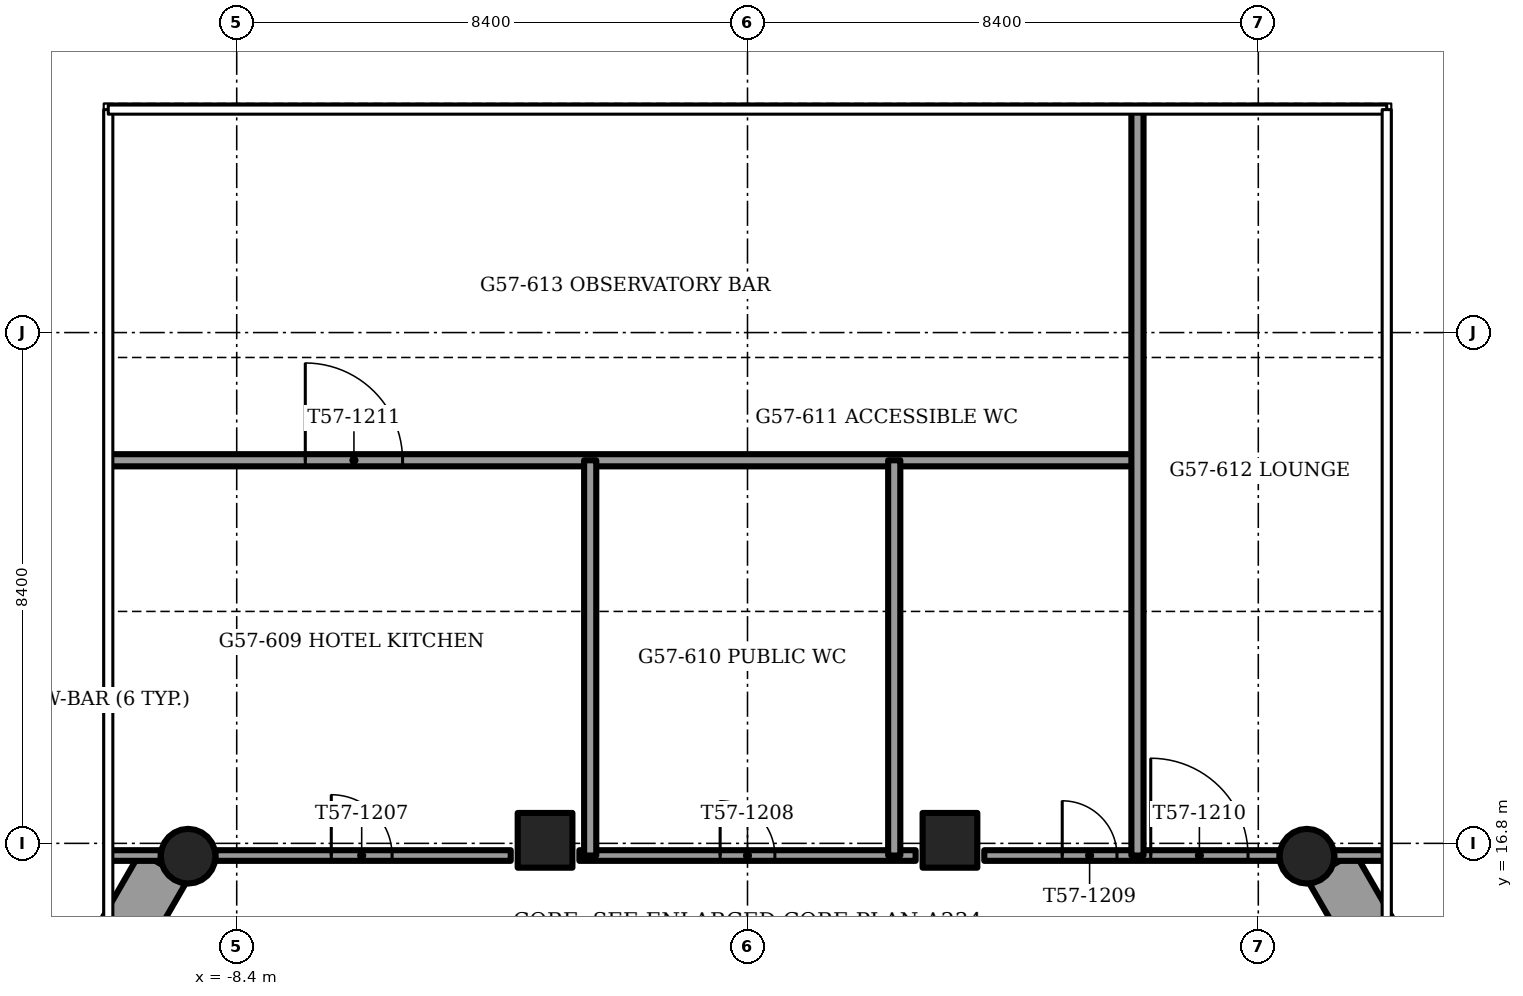
"""IFC4 building model, lengths in metres.
Left out: names, types, materials, properties, quantities, classifications, styles, units other than length and angle.
Written with IfcOpenShell. Run it as: python <this file> out.ifc"""

import sys

from ifc_helpers import new_model, si_unit, direction, frame, frame_2d, origin, origin_2d, place, context, subcontext, project, spatial, rectangle, circle, extrude, element, fill, save


model = new_model("IFC4")
c1 = context("Model", 3, precision=1e-05, world=origin(), true_north=direction((0.0, 1.0)))
c2 = subcontext(c1, "Body", "Model", "MODEL_VIEW")
j1 = project(units=[si_unit("LENGTHUNIT", "METRE"), si_unit("PLANEANGLEUNIT", "RADIAN")], contexts=[c1])
p1 = place(None, origin())
s1 = spatial("IfcSite", under=j1, at=p1, CompositionType="ELEMENT")
p2 = place(p1, origin())
s2 = spatial("IfcBuilding", under=s1, at=p2, CompositionType="ELEMENT")
p3 = place(p2, frame((0.0, 0.0, 229.5)))
s3 = spatial("IfcBuildingStorey", under=s2, at=p3, CompositionType="ELEMENT", Elevation=229.5)
for number, where, z_axis, x_axis in (
    (1, (-9.2, 16.589, -1.2), (0.0, 0.0, 1.0), (1.0, 0.0, 0.0)),
    (2, (9.2, 16.589, -1.2), (0.0, 0.0, 1.0), (1.0, 0.0, 0.0)),
):
    element("IfcColumn", number, at=place(p3, frame(where, z_axis=z_axis, x_axis=x_axis)), inside=s3, PredefinedType="COLUMN", context=c2, shape_type="SweptSolid", body=[
        extrude(circle(Radius=0.45, at=origin_2d()), origin(), (0.0, 0.0, 1.0), 3.75),
    ])
for number, where, z_axis, x_axis in (
    (3, (3.329, 16.85, -1.2), (0.0, 0.0, 1.0), (1.0, 0.0, 0.0)),
    (4, (-3.329, 16.85, -1.2), (0.0, 0.0, 1.0), (1.0, 0.0, 0.0)),
):
    element("IfcColumn", number, at=place(p3, frame(where, z_axis=z_axis, x_axis=x_axis)), inside=s3, PredefinedType="COLUMN", context=c2, shape_type="SweptSolid", body=[
        extrude(rectangle(XDim=0.9, YDim=0.9, at=origin_2d()), origin(), (0.0, 0.0, 1.0), 3.75),
    ])
for number, where, z_axis, x_axis in (
    (5, (-9.594, 16.428, 0.0), (0.0, 0.0, 1.0), (-0.5, -0.866, 0.0)),
    (6, (12.434, 11.508, 0.0), (0.0, 0.0, 1.0), (-0.5, 0.866, 0.0)),
):
    element("IfcWall", number, at=place(p3, frame(where, z_axis=z_axis, x_axis=x_axis)), inside=s3, PredefinedType="PARAPET", context=c2, shape_type="SweptSolid", body=[
        extrude(rectangle(XDim=5.681, YDim=0.9, at=frame_2d((2.84, 0.0))), origin(), (0.0, 0.0, 1.0), 1.1),
    ])
p4 = place(p3, frame((-10.493, 16.6, 0.0), z_axis=(0.0, 0.0, 1.0), x_axis=(1.0, 0.0, 0.0)))
e7 = element("IfcWall", 7, at=p4, inside=s3, PredefinedType="PARTITIONING", context=c2, shape_type="SweptSolid", body=[
    extrude(rectangle(XDim=0.845, YDim=0.175, at=frame_2d((0.422, 0.0))), origin(), (0.0, 0.0, 1.0), 2.55),
])
p5 = place(p3, frame((-8.751, 16.6, 0.0), z_axis=(0.0, 0.0, 1.0), x_axis=(1.0, 0.0, 0.0)))
e8 = element("IfcWall", 8, at=p5, inside=s3, PredefinedType="PARTITIONING", context=c2, shape_type="SweptSolid", body=[
    extrude(rectangle(XDim=4.857, YDim=0.175, at=frame_2d((2.429, 0.0))), origin(), (0.0, 0.0, 1.0), 3.45),
])
p6 = place(p5, frame((1.906, 0.0, 0.0)))
e9 = element("IfcOpeningElement", 9, at=p6, cuts=e8, PredefinedType="OPENING", context=c2, shape_type="SweptSolid", body=[
    extrude(rectangle(XDim=1.0, YDim=2.1, at=frame_2d((0.5, 1.05))), frame((0.0, 0.087, 0.0), z_axis=(0.0, -1.0, 0.0), x_axis=(1.0, 0.0, 0.0)), (0.0, 0.0, 1.0), 0.175),
])
p7 = place(p3, frame((-2.765, 16.6, 0.0), z_axis=(0.0, 0.0, 1.0), x_axis=(1.0, 0.0, 0.0)))
e10 = element("IfcWall", 10, at=p7, inside=s3, PredefinedType="PARTITIONING", context=c2, shape_type="SweptSolid", body=[
    extrude(rectangle(XDim=5.53, YDim=0.175, at=frame_2d((2.765, 0.0))), origin(), (0.0, 0.0, 1.0), 3.45),
])
p8 = place(p7, frame((2.315, 0.0, 0.0)))
e11 = element("IfcOpeningElement", 11, at=p8, cuts=e10, PredefinedType="OPENING", context=c2, shape_type="SweptSolid", body=[
    extrude(rectangle(XDim=0.9, YDim=2.1, at=frame_2d((0.45, 1.05))), frame((0.0, 0.087, 0.0), z_axis=(0.0, -1.0, 0.0), x_axis=(1.0, 0.0, 0.0)), (0.0, 0.0, 1.0), 0.175),
])
p9 = place(p3, frame((3.894, 16.6, 0.0), z_axis=(0.0, 0.0, 1.0), x_axis=(1.0, 0.0, 0.0)))
e12 = element("IfcWall", 12, at=p9, inside=s3, PredefinedType="PARTITIONING", context=c2, shape_type="SweptSolid", body=[
    extrude(rectangle(XDim=4.857, YDim=0.175, at=frame_2d((2.429, 0.0))), origin(), (0.0, 0.0, 1.0), 3.45),
])
p10 = place(p9, frame((1.282, 0.0, 0.0)))
e13 = element("IfcOpeningElement", 13, at=p10, cuts=e12, PredefinedType="OPENING", context=c2, shape_type="SweptSolid", body=[
    extrude(rectangle(XDim=0.9, YDim=2.1, at=frame_2d((0.45, 1.05))), frame((0.0, 0.087, 0.0), z_axis=(0.0, -1.0, 0.0), x_axis=(1.0, 0.0, 0.0)), (0.0, 0.0, 1.0), 0.175),
])
p11 = place(p9, frame((2.738, 0.0, 0.0)))
e14 = element("IfcOpeningElement", 14, at=p11, cuts=e12, PredefinedType="OPENING", context=c2, shape_type="SweptSolid", body=[
    extrude(rectangle(XDim=1.6, YDim=2.1, at=frame_2d((0.8, 1.05))), frame((0.0, 0.087, 0.0), z_axis=(0.0, -1.0, 0.0), x_axis=(1.0, 0.0, 0.0)), (0.0, 0.0, 1.0), 0.175),
])
p12 = place(p3, frame((9.648, 16.6, 0.0), z_axis=(0.0, 0.0, 1.0), x_axis=(1.0, 0.0, 0.0)))
e15 = element("IfcWall", 15, at=p12, inside=s3, PredefinedType="PARTITIONING", context=c2, shape_type="SweptSolid", body=[
    extrude(rectangle(XDim=0.845, YDim=0.175, at=frame_2d((0.422, 0.0))), origin(), (0.0, 0.0, 1.0), 2.55),
])
p13 = place(p3, frame((-10.493, 23.1, 0.0), z_axis=(0.0, 0.0, 1.0), x_axis=(1.0, 0.0, 0.0)))
e16 = element("IfcWall", 16, at=p13, inside=s3, PredefinedType="PARTITIONING", context=c2, shape_type="SweptSolid", body=[
    extrude(rectangle(XDim=16.906, YDim=0.2, at=frame_2d((8.453, 0.0))), origin(), (0.0, 0.0, 1.0), 3.45),
])
p14 = place(p13, frame((3.221, 0.0, 0.0)))
e17 = element("IfcOpeningElement", 17, at=p14, cuts=e16, PredefinedType="OPENING", context=c2, shape_type="SweptSolid", body=[
    extrude(rectangle(XDim=1.6, YDim=2.1, at=frame_2d((0.8, 1.05))), frame((0.0, 0.1, 0.0), z_axis=(0.0, -1.0, 0.0), x_axis=(1.0, 0.0, 0.0)), (0.0, 0.0, 1.0), 0.2),
])
for number, where, z_axis, x_axis in (
    (18, (-2.587, 16.6, 0.0), (0.0, 0.0, 1.0), (0.0, 1.0, 0.0)),
    (19, (2.413, 16.6, 0.0), (0.0, 0.0, 1.0), (0.0, 1.0, 0.0)),
):
    element("IfcWall", number, at=place(p3, frame(where, z_axis=z_axis, x_axis=x_axis)), inside=s3, PredefinedType="PARTITIONING", context=c2, shape_type="SweptSolid", body=[
        extrude(rectangle(XDim=6.5, YDim=0.2, at=frame_2d((3.25, 0.0))), origin(), (0.0, 0.0, 1.0), 2.839),
    ])
p15 = place(p3, frame((6.413, 16.6, 0.0), z_axis=(0.0, 0.0, 1.0), x_axis=(0.0, 1.0, 0.0)))
e20 = element("IfcWall", 20, at=p15, inside=s3, PredefinedType="PARTITIONING", context=c2, shape_type="SweptSolid", body=[
    extrude(rectangle(XDim=12.248, YDim=0.2, at=frame_2d((6.124, 0.0))), origin(), (0.0, 0.0, 1.0), 2.839),
])
p16 = place(p6, origin())
e21 = element("IfcDoor", 21, at=p16, inside=s3, OperationType="SINGLE_SWING_LEFT", PredefinedType="DOOR", context=c2, shape_type="SweptSolid", body=[
    extrude(rectangle(XDim=1.0, YDim=2.1, at=frame_2d((0.5, 1.05))), frame((0.0, 0.025, 0.0), z_axis=(0.0, -1.0, 0.0), x_axis=(1.0, 0.0, 0.0)), (0.0, 0.0, 1.0), 0.05),
])
fill(e9, e21)
p17 = place(p8, origin())
e22 = element("IfcDoor", 22, at=p17, inside=s3, OperationType="SINGLE_SWING_RIGHT", PredefinedType="DOOR", context=c2, shape_type="SweptSolid", body=[
    extrude(rectangle(XDim=0.9, YDim=2.1, at=frame_2d((0.45, 1.05))), frame((0.0, 0.025, 0.0), z_axis=(0.0, -1.0, 0.0), x_axis=(1.0, 0.0, 0.0)), (0.0, 0.0, 1.0), 0.05),
])
fill(e11, e22)
p18 = place(p10, origin())
e23 = element("IfcDoor", 23, at=p18, inside=s3, OperationType="SINGLE_SWING_LEFT", PredefinedType="DOOR", context=c2, shape_type="SweptSolid", body=[
    extrude(rectangle(XDim=0.9, YDim=2.1, at=frame_2d((0.45, 1.05))), frame((0.0, 0.025, 0.0), z_axis=(0.0, -1.0, 0.0), x_axis=(1.0, 0.0, 0.0)), (0.0, 0.0, 1.0), 0.05),
])
fill(e13, e23)
p19 = place(p11, origin())
e24 = element("IfcDoor", 24, at=p19, inside=s3, OperationType="DOUBLE_DOOR_SINGLE_SWING", PredefinedType="DOOR", context=c2, shape_type="SweptSolid", body=[
    extrude(rectangle(XDim=1.6, YDim=2.1, at=frame_2d((0.8, 1.05))), frame((0.0, 0.025, 0.0), z_axis=(0.0, -1.0, 0.0), x_axis=(1.0, 0.0, 0.0)), (0.0, 0.0, 1.0), 0.05),
])
fill(e14, e24)
p20 = place(p14, origin())
e25 = element("IfcDoor", 25, at=p20, inside=s3, OperationType="DOUBLE_DOOR_SINGLE_SWING", PredefinedType="DOOR", context=c2, shape_type="SweptSolid", body=[
    extrude(rectangle(XDim=1.6, YDim=2.1, at=frame_2d((0.8, 1.05))), frame((0.0, 0.025, 0.0), z_axis=(0.0, -1.0, 0.0), x_axis=(1.0, 0.0, 0.0)), (0.0, 0.0, 1.0), 0.05),
])
fill(e17, e25)
save(model, sys.argv[1])
